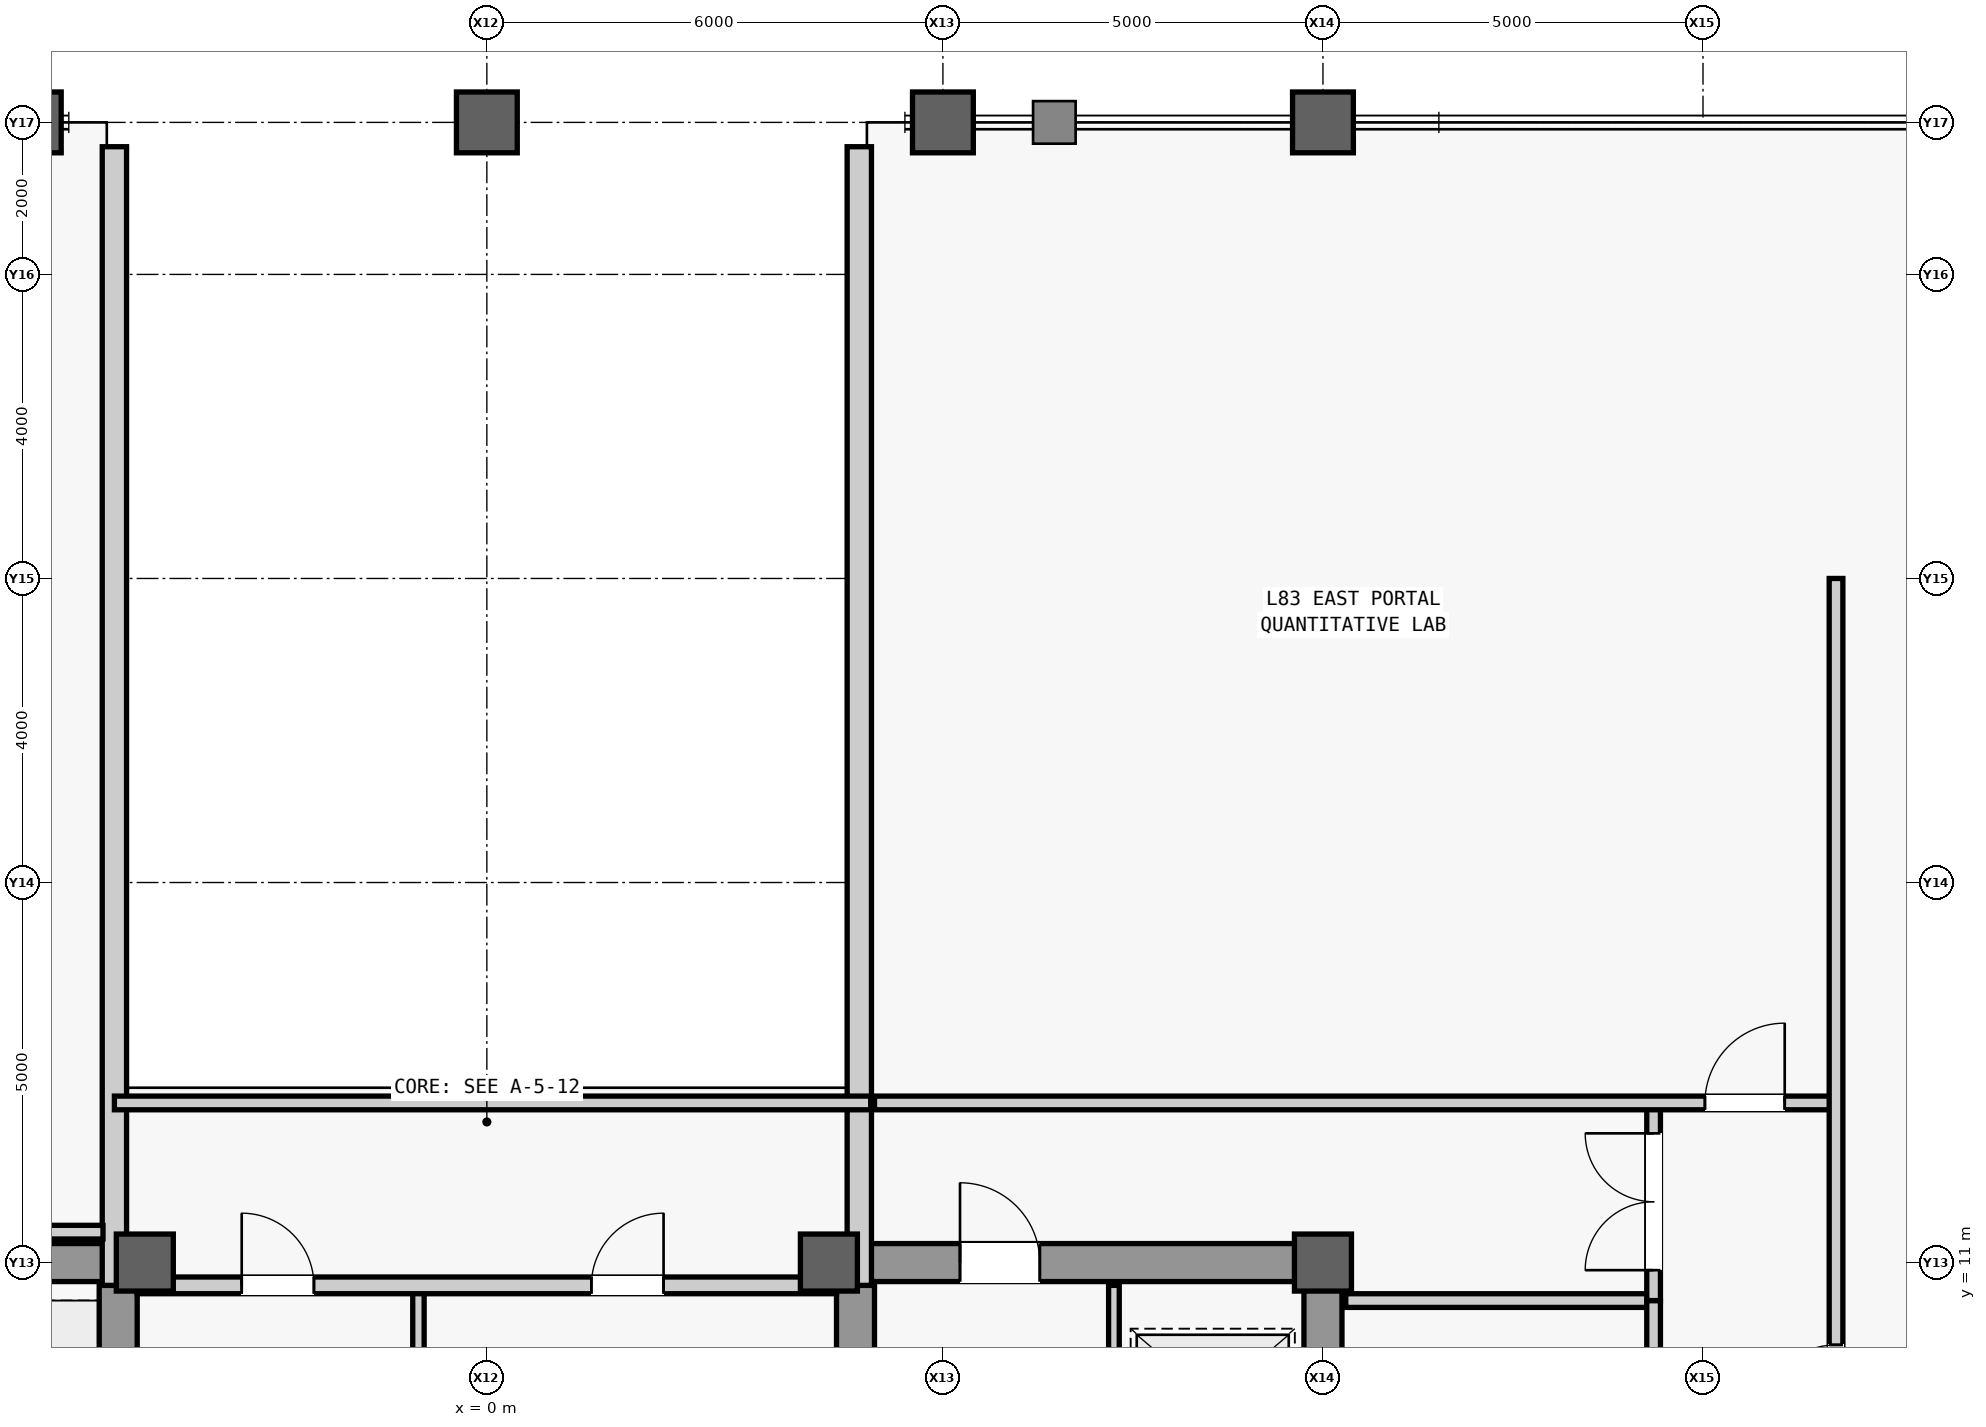
"""IFC4 building model, lengths in metres.
Left out: names, types, materials, properties, quantities, classifications, styles, units other than length and angle.
Written with IfcOpenShell. Run it as: python <this file> out.ifc"""

import sys

from ifc_helpers import new_model, si_unit, direction, frame, frame_2d, origin, origin_2d, place, context, subcontext, project, spatial, rectangle, hollow_rectangle, extrude, source, transform, mapped, element, fill, save


model = new_model("IFC4")
c1 = context("Model", 3, precision=1e-05, world=origin(), true_north=direction((0.0, 1.0)))
c2 = subcontext(c1, "Body", "Model", "MODEL_VIEW")
j1 = project(units=[si_unit("LENGTHUNIT", "METRE"), si_unit("PLANEANGLEUNIT", "RADIAN")], contexts=[c1])
p1 = place(None, origin())
s1 = spatial("IfcSite", under=j1, at=p1, CompositionType="ELEMENT")
p2 = place(p1, origin())
s2 = spatial("IfcBuilding", under=s1, at=p2, CompositionType="ELEMENT")
p3 = place(p2, frame((0.0, 0.0, 350.3)))
s3 = spatial("IfcBuildingStorey", under=s2, at=p3, CompositionType="ELEMENT", Elevation=350.3)
m1 = source(origin(), c2, "Body", "SweptSolid", [
    extrude(rectangle(XDim=22.0, YDim=0.5, at=frame_2d((11.0, 0.0))), origin(), (0.0, 0.0, 1.0), 3.74),
])
p4 = place(p3, frame((11.0, -11.0, 0.0), z_axis=(0.0, 0.0, 1.0), x_axis=(0.0, 1.0, 0.0)))
e1 = element("IfcWall", 1, at=p4, inside=s3, PredefinedType="SHEAR", context=c2, shape_type="MappedRepresentation", body=[
    mapped(m1, transform((0.0, 0.0, 0.0), scale=1.0)),
])
m2 = source(origin(), c2, "Body", "SweptSolid", [
    extrude(rectangle(XDim=1.1, YDim=2.2, at=frame_2d((0.55, 1.1))), frame((0.0, 0.26, 0.0), z_axis=(0.0, -1.0, 0.0), x_axis=(1.0, 0.0, 0.0)), (0.0, 0.0, 1.0), 0.52),
])
p5 = place(p4, frame((0.8, 0.0, 0.0)))
e2 = element("IfcOpeningElement", 2, at=p5, cuts=e1, PredefinedType="OPENING", context=c2, shape_type="MappedRepresentation", body=[
    mapped(m2, transform((0.0, 0.0, 0.0), scale=1.0)),
])
m3 = source(origin(), c2, "Body", "SweptSolid", [
    extrude(rectangle(XDim=0.9, YDim=2.15, at=frame_2d((0.45, 1.075))), frame((0.0, 0.26, 0.0), z_axis=(0.0, -1.0, 0.0), x_axis=(1.0, 0.0, 0.0)), (0.0, 0.0, 1.0), 0.52),
])
p6 = place(p4, frame((6.85, 0.0, 0.0)))
e3 = element("IfcOpeningElement", 3, at=p6, cuts=e1, PredefinedType="OPENING", context=c2, shape_type="MappedRepresentation", body=[
    mapped(m3, transform((0.0, 0.0, 0.0), scale=1.0)),
])
m4 = source(origin(), c2, "Body", "SweptSolid", [
    extrude(rectangle(XDim=1.2, YDim=2.3, at=frame_2d((0.6, 1.15))), frame((0.0, 0.26, 0.0), z_axis=(0.0, -1.0, 0.0), x_axis=(1.0, 0.0, 0.0)), (0.0, 0.0, 1.0), 0.52),
])
p7 = place(p4, frame((17.6, 0.0, 0.0)))
e4 = element("IfcOpeningElement", 4, at=p7, cuts=e1, PredefinedType="OPENING", context=c2, shape_type="MappedRepresentation", body=[
    mapped(m4, transform((0.0, 0.0, 0.0), scale=1.0)),
])
p8 = place(p4, frame((19.6, 0.0, 0.0)))
e5 = element("IfcOpeningElement", 5, at=p8, cuts=e1, PredefinedType="OPENING", context=c2, shape_type="MappedRepresentation", body=[
    mapped(m4, transform((0.0, 0.0, 0.0), scale=1.0)),
])
m5 = source(origin(), c2, "Body", "SweptSolid", [
    extrude(rectangle(XDim=1.3, YDim=2.3, at=frame_2d((0.65, 1.15))), frame((0.0, 0.26, 0.0), z_axis=(0.0, -1.0, 0.0), x_axis=(1.0, 0.0, 0.0)), (0.0, 0.0, 1.0), 0.52),
])
p9 = place(p4, frame((2.7, 0.0, 0.0)))
e6 = element("IfcOpeningElement", 6, at=p9, cuts=e1, PredefinedType="OPENING", context=c2, shape_type="MappedRepresentation", body=[
    mapped(m5, transform((0.0, 0.0, 0.0), scale=1.0)),
])
p10 = place(p4, frame((13.35, 0.0, 0.0)))
e7 = element("IfcOpeningElement", 7, at=p10, cuts=e1, PredefinedType="OPENING", context=c2, shape_type="MappedRepresentation", body=[
    mapped(m5, transform((0.0, 0.0, 0.0), scale=1.0)),
])
m6 = source(origin(), c2, "Body", "SweptSolid", [
    extrude(rectangle(XDim=21.4, YDim=0.5, at=frame_2d((10.7, 0.0))), origin(), (0.0, 0.0, 1.0), 3.74),
])
for number, where, z_axis, x_axis in (
    (8, (-4.85, -10.7, 0.0), (0.0, 0.0, 1.0), (0.0, 1.0, 0.0)),
    (9, (4.85, -10.7, 0.0), (0.0, 0.0, 1.0), (0.0, 1.0, 0.0)),
):
    element("IfcWall", number, at=place(p3, frame(where, z_axis=z_axis, x_axis=x_axis)), inside=s3, PredefinedType="SHEAR", context=c2, shape_type="MappedRepresentation", body=[
        mapped(m6, transform((0.0, 0.0, 0.0), scale=1.0)),
    ])
m7 = source(origin(), c2, "Body", "SweptSolid", [
    extrude(rectangle(XDim=5.9, YDim=0.5, at=frame_2d((2.95, 0.0))), origin(), (0.0, 0.0, 1.0), 3.74),
])
p11 = place(p3, frame((-10.75, 11.0, 0.0), z_axis=(0.0, 0.0, 1.0), x_axis=(1.0, 0.0, 0.0)))
e10 = element("IfcWall", 10, at=p11, inside=s3, PredefinedType="SHEAR", context=c2, shape_type="MappedRepresentation", body=[
    mapped(m7, transform((0.0, 0.0, 0.0), scale=1.0)),
])
p12 = place(p3, frame((4.85, 11.0, 0.0), z_axis=(0.0, 0.0, 1.0), x_axis=(1.0, 0.0, 0.0)))
e11 = element("IfcWall", 11, at=p12, inside=s3, PredefinedType="SHEAR", context=c2, shape_type="MappedRepresentation", body=[
    mapped(m7, transform((0.0, 0.0, 0.0), scale=1.0)),
])
m8 = source(origin(), c2, "Body", "SweptSolid", [
    extrude(rectangle(XDim=1.05, YDim=2.2, at=frame_2d((0.525, 1.1))), frame((0.0, 0.26, 0.0), z_axis=(0.0, -1.0, 0.0), x_axis=(1.0, 0.0, 0.0)), (0.0, 0.0, 1.0), 0.52),
])
p13 = place(p12, frame((1.375, 0.0, 0.0)))
e12 = element("IfcOpeningElement", 12, at=p13, cuts=e11, PredefinedType="OPENING", context=c2, shape_type="MappedRepresentation", body=[
    mapped(m8, transform((0.0, 0.0, 0.0), scale=1.0)),
])
m9 = source(origin(), c2, "Body", "SweptSolid", [
    extrude(hollow_rectangle(XDim=0.8, YDim=0.8, WallThickness=0.045, at=origin_2d()), origin(), (0.0, 0.0, 1.0), 4.0),
])
p14 = place(p3, frame((-6.0, 26.0, 0.0), z_axis=(0.0, 0.0, 1.0), x_axis=(1.0, 0.0, 0.0)))
e13 = element("IfcColumn", 13, at=p14, inside=s3, PredefinedType="COLUMN", context=c2, shape_type="MappedRepresentation", body=[
    mapped(m9, transform((0.0, 0.0, 0.0), scale=1.0)),
])
m10 = source(origin(), c2, "Body", "SweptSolid", [
    extrude(rectangle(XDim=0.75, YDim=0.75, at=origin_2d()), origin(), (0.0, 0.0, 1.0), 4.0),
])
p15 = place(p3, frame((-4.5, 11.0, 0.0), z_axis=(0.0, 0.0, 1.0), x_axis=(1.0, 0.0, 0.0)))
e14 = element("IfcColumn", 14, at=p15, inside=s3, PredefinedType="COLUMN", context=c2, shape_type="MappedRepresentation", body=[
    mapped(m10, transform((0.0, 0.0, 0.0), scale=1.0)),
])
p16 = place(p3, frame((0.0, 26.0, 0.0), z_axis=(0.0, 0.0, 1.0), x_axis=(1.0, 0.0, 0.0)))
e15 = element("IfcColumn", 15, at=p16, inside=s3, PredefinedType="COLUMN", context=c2, shape_type="MappedRepresentation", body=[
    mapped(m9, transform((0.0, 0.0, 0.0), scale=1.0)),
])
p17 = place(p3, frame((4.5, 11.0, 0.0), z_axis=(0.0, 0.0, 1.0), x_axis=(1.0, 0.0, 0.0)))
e16 = element("IfcColumn", 16, at=p17, inside=s3, PredefinedType="COLUMN", context=c2, shape_type="MappedRepresentation", body=[
    mapped(m10, transform((0.0, 0.0, 0.0), scale=1.0)),
])
p18 = place(p3, frame((6.0, 26.0, 0.0), z_axis=(0.0, 0.0, 1.0), x_axis=(1.0, 0.0, 0.0)))
e17 = element("IfcColumn", 17, at=p18, inside=s3, PredefinedType="COLUMN", context=c2, shape_type="MappedRepresentation", body=[
    mapped(m9, transform((0.0, 0.0, 0.0), scale=1.0)),
])
p19 = place(p3, frame((11.0, 11.0, 0.0), z_axis=(0.0, 0.0, 1.0), x_axis=(1.0, 0.0, 0.0)))
e18 = element("IfcColumn", 18, at=p19, inside=s3, PredefinedType="COLUMN", context=c2, shape_type="MappedRepresentation", body=[
    mapped(m10, transform((0.0, 0.0, 0.0), scale=1.0)),
])
p20 = place(p3, frame((11.0, 26.0, 0.0), z_axis=(0.0, 0.0, 1.0), x_axis=(1.0, 0.0, 0.0)))
e19 = element("IfcColumn", 19, at=p20, inside=s3, PredefinedType="COLUMN", context=c2, shape_type="MappedRepresentation", body=[
    mapped(m9, transform((0.0, 0.0, 0.0), scale=1.0)),
])
m11 = source(origin(), c2, "Body", "SweptSolid", [
    extrude(rectangle(XDim=14.98, YDim=0.32, at=frame_2d((7.49, 0.0))), origin(), (0.0, 0.0, 1.0), 3.045),
])
for number, where, z_axis, x_axis in (
    (20, (-4.9, 10.7, 0.0), (0.0, 0.0, 1.0), (0.0, 1.0, 0.0)),
    (21, (4.9, 10.7, 0.0), (0.0, 0.0, 1.0), (0.0, 1.0, 0.0)),
):
    element("IfcWall", number, at=place(p3, frame(where, z_axis=z_axis, x_axis=x_axis)), inside=s3, PredefinedType="STANDARD", context=c2, shape_type="MappedRepresentation", body=[
        mapped(m11, transform((0.0, 0.0, 0.0), scale=1.0)),
    ])
m12 = source(origin(), c2, "Body", "SweptSolid", [
    extrude(rectangle(XDim=9.4, YDim=0.14, at=frame_2d((4.7, 0.0))), origin(), (0.0, 0.0, 1.0), 3.74),
])
p21 = place(p3, frame((8.25, 1.3, 0.0), z_axis=(0.0, 0.0, 1.0), x_axis=(0.0, 1.0, 0.0)))
e22 = element("IfcWall", 22, at=p21, inside=s3, PredefinedType="PARTITIONING", context=c2, shape_type="MappedRepresentation", body=[
    mapped(m12, transform((0.0, 0.0, 0.0), scale=1.0)),
])
m13 = source(origin(), c2, "Body", "SweptSolid", [
    extrude(rectangle(XDim=4.05, YDim=0.18, at=frame_2d((2.025, 0.0))), origin(), (0.0, 0.0, 1.0), 3.74),
])
p22 = place(p3, frame((11.3, 10.5, 0.0), z_axis=(0.0, 0.0, 1.0), x_axis=(1.0, 0.0, 0.0)))
e23 = element("IfcWall", 23, at=p22, inside=s3, PredefinedType="PARTITIONING", context=c2, shape_type="MappedRepresentation", body=[
    mapped(m13, transform((0.0, 0.0, 0.0), scale=1.0)),
])
m14 = source(origin(), c2, "Body", "SweptSolid", [
    extrude(rectangle(XDim=16.6, YDim=0.18, at=frame_2d((8.3, 0.0))), origin(), (0.0, 0.0, 1.0), 3.74),
])
p23 = place(p3, frame((15.35, -6.1, 0.0), z_axis=(0.0, 0.0, 1.0), x_axis=(0.0, 1.0, 0.0)))
e24 = element("IfcWall", 24, at=p23, inside=s3, PredefinedType="PARTITIONING", context=c2, shape_type="MappedRepresentation", body=[
    mapped(m14, transform((0.0, 0.0, 0.0), scale=1.0)),
])
m15 = source(origin(), c2, "Body", "SweptSolid", [
    extrude(rectangle(XDim=1.8, YDim=2.25, at=frame_2d((0.9, 1.125))), frame((0.0, 0.1, 0.0), z_axis=(0.0, -1.0, 0.0), x_axis=(1.0, 0.0, 0.0)), (0.0, 0.0, 1.0), 0.2),
])
p24 = place(p23, frame((2.7, 0.0, 0.0)))
e25 = element("IfcOpeningElement", 25, at=p24, cuts=e24, PredefinedType="OPENING", context=c2, shape_type="MappedRepresentation", body=[
    mapped(m15, transform((0.0, 0.0, 0.0), scale=1.0)),
])
p25 = place(p23, frame((13.0, 0.0, 0.0)))
e26 = element("IfcOpeningElement", 26, at=p25, cuts=e24, PredefinedType="OPENING", context=c2, shape_type="MappedRepresentation", body=[
    mapped(m15, transform((0.0, 0.0, 0.0), scale=1.0)),
])
m16 = source(origin(), c2, "Body", "SweptSolid", [
    extrude(rectangle(XDim=5.4, YDim=0.15, at=frame_2d((2.7, 0.0))), origin(), (0.0, 0.0, 1.0), 3.74),
])
p26 = place(p3, frame((-0.9, 5.3, 0.0), z_axis=(0.0, 0.0, 1.0), x_axis=(0.0, 1.0, 0.0)))
e27 = element("IfcWall", 27, at=p26, inside=s3, PredefinedType="PARTITIONING", context=c2, shape_type="MappedRepresentation", body=[
    mapped(m16, transform((0.0, 0.0, 0.0), scale=1.0)),
])
m17 = source(origin(), c2, "Body", "SweptSolid", [
    extrude(rectangle(XDim=9.2, YDim=0.22, at=frame_2d((4.6, 0.0))), origin(), (0.0, 0.0, 1.0), 3.74),
])
p27 = place(p3, frame((-4.6, 10.7, 0.0), z_axis=(0.0, 0.0, 1.0), x_axis=(1.0, 0.0, 0.0)))
e28 = element("IfcWall", 28, at=p27, inside=s3, PredefinedType="PARTITIONING", context=c2, shape_type="MappedRepresentation", body=[
    mapped(m17, transform((0.0, 0.0, 0.0), scale=1.0)),
])
m18 = source(origin(), c2, "Body", "SweptSolid", [
    extrude(rectangle(XDim=0.95, YDim=2.15, at=frame_2d((0.475, 1.075))), frame((0.0, 0.12, 0.0), z_axis=(0.0, -1.0, 0.0), x_axis=(1.0, 0.0, 0.0)), (0.0, 0.0, 1.0), 0.24),
])
p28 = place(p27, frame((1.375, 0.0, 0.0)))
e29 = element("IfcOpeningElement", 29, at=p28, cuts=e28, PredefinedType="OPENING", context=c2, shape_type="MappedRepresentation", body=[
    mapped(m18, transform((0.0, 0.0, 0.0), scale=1.0)),
])
p29 = place(p27, frame((5.975, 0.0, 0.0)))
e30 = element("IfcOpeningElement", 30, at=p29, cuts=e28, PredefinedType="OPENING", context=c2, shape_type="MappedRepresentation", body=[
    mapped(m18, transform((0.0, 0.0, 0.0), scale=1.0)),
])
m19 = source(origin(), c2, "Body", "SweptSolid", [
    extrude(rectangle(XDim=9.95, YDim=0.18, at=frame_2d((4.975, 0.0))), origin(), (0.0, 0.0, 1.0), 3.74),
])
p30 = place(p3, frame((-4.9, 13.1, 0.0), z_axis=(0.0, 0.0, 1.0), x_axis=(1.0, 0.0, 0.0)))
e31 = element("IfcWall", 31, at=p30, inside=s3, PredefinedType="PARTITIONING", context=c2, shape_type="MappedRepresentation", body=[
    mapped(m19, transform((0.0, 0.0, 0.0), scale=1.0)),
])
m20 = source(origin(), c2, "Body", "SweptSolid", [
    extrude(rectangle(XDim=2.6, YDim=0.18, at=frame_2d((1.3, 0.0))), origin(), (0.0, 0.0, 1.0), 3.74),
])
p31 = place(p3, frame((15.35, 10.5, 0.0), z_axis=(0.0, 0.0, 1.0), x_axis=(0.0, 1.0, 0.0)))
e32 = element("IfcWall", 32, at=p31, inside=s3, PredefinedType="PARTITIONING", context=c2, shape_type="MappedRepresentation", body=[
    mapped(m20, transform((0.0, 0.0, 0.0), scale=1.0)),
])
p32 = place(p31, frame((0.4, 0.0, 0.0)))
e33 = element("IfcOpeningElement", 33, at=p32, cuts=e32, PredefinedType="OPENING", context=c2, shape_type="MappedRepresentation", body=[
    mapped(m15, transform((0.0, 0.0, 0.0), scale=1.0)),
])
m21 = source(origin(), c2, "Body", "SweptSolid", [
    extrude(rectangle(XDim=12.7, YDim=0.18, at=frame_2d((6.35, 0.0))), origin(), (0.0, 0.0, 1.0), 2.79),
])
p33 = place(p3, frame((-17.75, 11.4, 0.0), z_axis=(0.0, 0.0, 1.0), x_axis=(1.0, 0.0, 0.0)))
e34 = element("IfcWall", 34, at=p33, inside=s3, PredefinedType="PARTITIONING", context=c2, shape_type="MappedRepresentation", body=[
    mapped(m21, transform((0.0, 0.0, 0.0), scale=1.0)),
])
m22 = source(origin(), c2, "Body", "SweptSolid", [
    extrude(rectangle(XDim=1.05, YDim=2.2, at=frame_2d((0.525, 1.1))), frame((0.0, 0.1, 0.0), z_axis=(0.0, -1.0, 0.0), x_axis=(1.0, 0.0, 0.0)), (0.0, 0.0, 1.0), 0.2),
])
p34 = place(p33, frame((0.675, 0.0, 0.0)))
e35 = element("IfcOpeningElement", 35, at=p34, cuts=e34, PredefinedType="OPENING", context=c2, shape_type="MappedRepresentation", body=[
    mapped(m22, transform((0.0, 0.0, 0.0), scale=1.0)),
])
m23 = source(origin(), c2, "Body", "SweptSolid", [
    extrude(rectangle(XDim=12.65, YDim=0.18, at=frame_2d((6.325, 0.0))), origin(), (0.0, 0.0, 1.0), 3.74),
])
p35 = place(p3, frame((5.1, 13.1, 0.0), z_axis=(0.0, 0.0, 1.0), x_axis=(1.0, 0.0, 0.0)))
e36 = element("IfcWall", 36, at=p35, inside=s3, PredefinedType="PARTITIONING", context=c2, shape_type="MappedRepresentation", body=[
    mapped(m23, transform((0.0, 0.0, 0.0), scale=1.0)),
])
p36 = place(p35, frame((10.925, 0.0, 0.0)))
e37 = element("IfcOpeningElement", 37, at=p36, cuts=e36, PredefinedType="OPENING", context=c2, shape_type="MappedRepresentation", body=[
    mapped(m22, transform((0.0, 0.0, 0.0), scale=1.0)),
])
m24 = source(origin(), c2, "Body", "SweptSolid", [
    extrude(rectangle(XDim=40.0, YDim=0.18, at=frame_2d((20.0, 0.0))), origin(), (0.0, 0.0, 1.0), 3.74),
])
p37 = place(p3, frame((17.75, -20.0, 0.0), z_axis=(0.0, 0.0, 1.0), x_axis=(0.0, 1.0, 0.0)))
e38 = element("IfcWall", 38, at=p37, inside=s3, PredefinedType="PARTITIONING", context=c2, shape_type="MappedRepresentation", body=[
    mapped(m24, transform((0.0, 0.0, 0.0), scale=1.0)),
])
m25 = source(origin(), c2, "Body", "SweptSolid", [
    extrude(rectangle(XDim=0.95, YDim=2.15, at=frame_2d((0.475, 1.075))), frame((0.0, 0.1, 0.0), z_axis=(0.0, -1.0, 0.0), x_axis=(1.0, 0.0, 0.0)), (0.0, 0.0, 1.0), 0.2),
])
p38 = place(p37, frame((11.161, 0.0, 0.0)))
e39 = element("IfcOpeningElement", 39, at=p38, cuts=e38, PredefinedType="OPENING", context=c2, shape_type="MappedRepresentation", body=[
    mapped(m25, transform((0.0, 0.0, 0.0), scale=1.0)),
])
p39 = place(p37, frame((16.789, 0.0, 0.0)))
e40 = element("IfcOpeningElement", 40, at=p39, cuts=e38, PredefinedType="OPENING", context=c2, shape_type="MappedRepresentation", body=[
    mapped(m25, transform((0.0, 0.0, 0.0), scale=1.0)),
])
p40 = place(p37, frame((22.945, 0.0, 0.0)))
e41 = element("IfcOpeningElement", 41, at=p40, cuts=e38, PredefinedType="OPENING", context=c2, shape_type="MappedRepresentation", body=[
    mapped(m25, transform((0.0, 0.0, 0.0), scale=1.0)),
])
p41 = place(p37, frame((28.967, 0.0, 0.0)))
e42 = element("IfcOpeningElement", 42, at=p41, cuts=e38, PredefinedType="OPENING", context=c2, shape_type="MappedRepresentation", body=[
    mapped(m25, transform((0.0, 0.0, 0.0), scale=1.0)),
])
m26 = source(origin(), c2, "Body", "SweptSolid", [
    extrude(rectangle(XDim=1.05, YDim=2.2, at=frame_2d((0.525, 1.1))), frame((0.0, 0.025, 0.0), z_axis=(0.0, -1.0, 0.0), x_axis=(1.0, 0.0, 0.0)), (0.0, 0.0, 1.0), 0.05),
])
p42 = place(p13, origin())
e43 = element("IfcDoor", 43, at=p42, inside=s3, OperationType="SINGLE_SWING_LEFT", PredefinedType="DOOR", context=c2, shape_type="MappedRepresentation", body=[
    mapped(m26, transform((0.0, 0.0, 0.0), scale=1.0)),
])
fill(e12, e43)
m27 = source(origin(), c2, "Body", "SweptSolid", [
    extrude(rectangle(XDim=0.95, YDim=2.15, at=frame_2d((0.475, 1.075))), frame((0.0, 0.025, 0.0), z_axis=(0.0, -1.0, 0.0), x_axis=(1.0, 0.0, 0.0)), (0.0, 0.0, 1.0), 0.05),
])
p43 = place(p28, origin())
e44 = element("IfcDoor", 44, at=p43, inside=s3, OperationType="SINGLE_SWING_LEFT", PredefinedType="DOOR", context=c2, shape_type="MappedRepresentation", body=[
    mapped(m27, transform((0.0, 0.0, 0.0), scale=1.0)),
])
fill(e29, e44)
p44 = place(p29, origin())
e45 = element("IfcDoor", 45, at=p44, inside=s3, OperationType="SINGLE_SWING_RIGHT", PredefinedType="DOOR", context=c2, shape_type="MappedRepresentation", body=[
    mapped(m27, transform((0.0, 0.0, 0.0), scale=1.0)),
])
fill(e30, e45)
m28 = source(origin(), c2, "Body", "SweptSolid", [
    extrude(rectangle(XDim=1.8, YDim=2.25, at=frame_2d((0.9, 1.125))), frame((0.0, 0.025, 0.0), z_axis=(0.0, -1.0, 0.0), x_axis=(1.0, 0.0, 0.0)), (0.0, 0.0, 1.0), 0.05),
])
p45 = place(p32, origin())
e46 = element("IfcDoor", 46, at=p45, inside=s3, OperationType="DOUBLE_DOOR_SINGLE_SWING", PredefinedType="DOOR", context=c2, shape_type="MappedRepresentation", body=[
    mapped(m28, transform((0.0, 0.0, 0.0), scale=1.0)),
])
fill(e33, e46)
p46 = place(p36, origin())
e47 = element("IfcDoor", 47, at=p46, inside=s3, OperationType="SINGLE_SWING_RIGHT", PredefinedType="DOOR", context=c2, shape_type="MappedRepresentation", body=[
    mapped(m26, transform((0.0, 0.0, 0.0), scale=1.0)),
])
fill(e37, e47)
p47 = place(p41, origin())
e48 = element("IfcDoor", 48, at=p47, inside=s3, OperationType="SINGLE_SWING_LEFT", PredefinedType="DOOR", context=c2, shape_type="MappedRepresentation", body=[
    mapped(m27, transform((0.0, 0.0, 0.0), scale=1.0)),
])
fill(e42, e48)
save(model, sys.argv[1])
